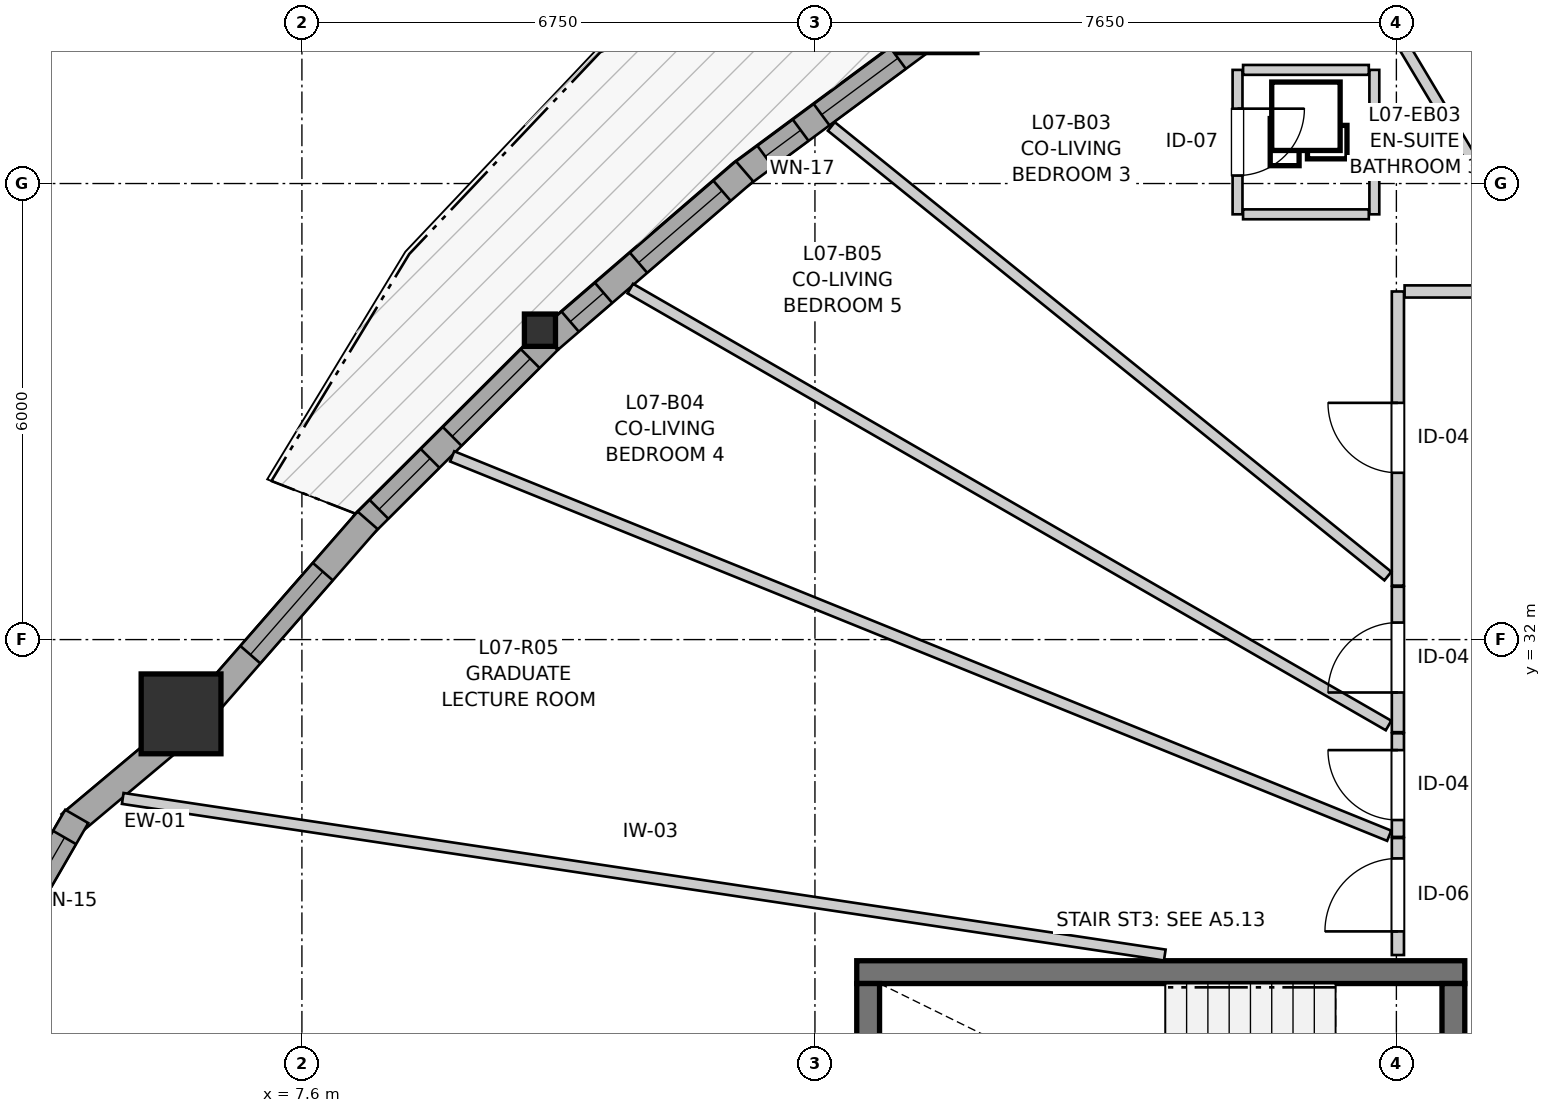
"""IFC4 building model, lengths in metres.
Left out: names, types, materials, properties, quantities, classifications, styles, units other than length and angle.
Written with IfcOpenShell. Run it as: python <this file> out.ifc"""

import sys

from ifc_helpers import new_model, si_unit, direction, frame, frame_2d, origin, origin_2d, place, context, subcontext, project, spatial, rectangle, i_section, extrude, source, transform, mapped, element, fill, save


model = new_model("IFC4")
c1 = context("Model", 3, precision=1e-05, world=origin(), true_north=direction((0.0, 1.0)))
c2 = subcontext(c1, "Body", "Model", "MODEL_VIEW")
j1 = project(units=[si_unit("LENGTHUNIT", "METRE"), si_unit("PLANEANGLEUNIT", "RADIAN")], contexts=[c1])
p1 = place(None, origin())
s1 = spatial("IfcSite", under=j1, at=p1, CompositionType="ELEMENT")
p2 = place(p1, origin())
s2 = spatial("IfcBuilding", under=s1, at=p2, CompositionType="ELEMENT")
p3 = place(p2, frame((0.0, 0.0, 27.0)))
s3 = spatial("IfcBuildingStorey", under=s2, at=p3, CompositionType="ELEMENT", Elevation=27.0)
p4 = place(p3, frame((22.9, 27.625, 0.0), z_axis=(0.0, 0.0, 1.0), x_axis=(-1.0, 0.0, 0.0)))
e1 = element("IfcWall", 1, at=p4, inside=s3, PredefinedType="SHEAR", context=c2, shape_type="SweptSolid", body=[
    extrude(rectangle(XDim=8.0, YDim=0.3, at=frame_2d((4.0, 0.0))), origin(), (0.0, 0.0, 1.0), 2.935),
])
p5 = place(p3, frame((15.05, 27.475, 0.0), z_axis=(0.0, 0.0, 1.0), x_axis=(0.0, -1.0, 0.0)))
e2 = element("IfcWall", 2, at=p5, inside=s3, PredefinedType="SHEAR", context=c2, shape_type="SweptSolid", body=[
    extrude(rectangle(XDim=2.95, YDim=0.3, at=frame_2d((1.475, 0.0))), origin(), (0.0, 0.0, 1.0), 2.935),
])
p6 = place(p3, frame((22.75, 24.525, 0.0), z_axis=(0.0, 0.0, 1.0), x_axis=(0.0, 1.0, 0.0)))
e3 = element("IfcWall", 3, at=p6, inside=s3, PredefinedType="SHEAR", context=c2, shape_type="SweptSolid", body=[
    extrude(rectangle(XDim=2.95, YDim=0.3, at=frame_2d((1.475, 0.0))), origin(), (0.0, 0.0, 1.0), 2.935),
])
p7 = place(p6, frame((0.985, 0.0, 0.0)))
e4 = element("IfcOpeningElement", 4, at=p7, cuts=e3, PredefinedType="OPENING", context=c2, shape_type="SweptSolid", body=[
    extrude(rectangle(XDim=0.98, YDim=2.15, at=frame_2d((0.49, 1.075))), frame((0.0, 0.16, 0.0), z_axis=(0.0, -1.0, 0.0), x_axis=(1.0, 0.0, 0.0)), (0.0, 0.0, 1.0), 0.32),
])
m1 = source(origin(), c2, "Body", "SweptSolid", [
    extrude(rectangle(XDim=1.05, YDim=1.05, at=origin_2d()), origin(), (0.0, 0.0, 1.0), 2.935),
])
for number, where, z_axis, x_axis in (
    (5, (6.01, 31.023, 0.0), (0.0, 0.0, 1.0), (1.0, 0.0, 0.0)),
    (6, (15.956, 40.247, 0.0), (0.0, 0.0, 1.0), (1.0, 0.0, 0.0)),
):
    element("IfcColumn", number, at=place(p3, frame(where, z_axis=z_axis, x_axis=x_axis)), inside=s3, PredefinedType="COLUMN", context=c2, shape_type="MappedRepresentation", body=[
        mapped(m1, transform((0.0, 0.0, 0.0), x_axis=(1.0, 0.0, 0.0), y_axis=(0.0, 1.0, 0.0), z_axis=(0.0, 0.0, 1.0), scale=1.0)),
    ])
m2 = source(origin(), c2, "Body", "SweptSolid", [
    extrude(i_section(OverallWidth=0.409, OverallDepth=0.425, WebThickness=0.03, FlangeThickness=0.048, FilletRadius=0.015, at=origin_2d()), origin(), (0.0, 0.0, 1.0), 2.935),
])
p8 = place(p3, frame((10.732, 36.07, 0.0), z_axis=(0.0, 0.0, 1.0), x_axis=(1.0, 0.0, 0.0)))
e7 = element("IfcColumn", 7, at=p8, inside=s3, PredefinedType="PILASTER", context=c2, shape_type="MappedRepresentation", body=[
    mapped(m2, transform((0.0, 0.0, 0.0), x_axis=(1.0, 0.0, 0.0), y_axis=(0.0, 1.0, 0.0), z_axis=(0.0, 0.0, 1.0), scale=1.0)),
])
p9 = place(p3, frame((5.893, 30.696, 0.0), z_axis=(0.0, 0.0, 1.0), x_axis=(-0.766001205563, -0.64283913468, 0.0)))
e8 = element("IfcWall", 8, at=p9, inside=s3, PredefinedType="SOLIDWALL", context=c2, shape_type="SweptSolid", body=[
    extrude(rectangle(XDim=1.752, YDim=0.35, at=frame_2d((0.876, 0.0))), origin(), (0.0, 0.0, 1.0), 2.415),
])
p10 = place(p3, frame((4.637, 29.674, 0.0), z_axis=(0.0, 0.0, 1.0), x_axis=(-0.499995423472, -0.866028046028, 0.0)))
e9 = element("IfcWall", 9, at=p10, inside=s3, PredefinedType="SOLIDWALL", context=c2, shape_type="SweptSolid", body=[
    extrude(rectangle(XDim=2.09, YDim=0.35, at=frame_2d((1.045, 0.0))), origin(), (0.0, 0.0, 1.0), 2.415),
])
p11 = place(p10, frame((0.32, 0.0, 0.82)))
e10 = element("IfcOpeningElement", 10, at=p11, cuts=e9, PredefinedType="OPENING", context=c2, shape_type="SweptSolid", body=[
    extrude(rectangle(XDim=1.45, YDim=1.25, at=frame_2d((0.725, 0.625))), frame((0.0, 0.185, 0.0), z_axis=(0.0, -1.0, 0.0), x_axis=(1.0, 0.0, 0.0)), (0.0, 0.0, 1.0), 0.37),
])
p12 = place(p3, frame((15.819, 39.928, 0.0), z_axis=(0.0, 0.0, 1.0), x_axis=(-0.803825144674, -0.594865645999, 0.0)))
e11 = element("IfcWall", 11, at=p12, inside=s3, PredefinedType="SOLIDWALL", context=c2, shape_type="SweptSolid", body=[
    extrude(rectangle(XDim=3.066, YDim=0.35, at=frame_2d((1.533, 0.0))), origin(), (0.0, 0.0, 1.0), 2.415),
])
p13 = place(p12, frame((0.469, 0.0, 0.82)))
e12 = element("IfcOpeningElement", 12, at=p13, cuts=e11, PredefinedType="OPENING", context=c2, shape_type="SweptSolid", body=[
    extrude(rectangle(XDim=1.25, YDim=1.35, at=frame_2d((0.625, 0.675))), frame((0.0, 0.185, 0.0), z_axis=(0.0, -1.0, 0.0), x_axis=(1.0, 0.0, 0.0)), (0.0, 0.0, 1.0), 0.37),
])
p14 = place(p12, frame((2.062, 0.0, 0.82)))
e13 = element("IfcOpeningElement", 13, at=p14, cuts=e11, PredefinedType="OPENING", context=c2, shape_type="SweptSolid", body=[
    extrude(rectangle(XDim=0.58, YDim=1.35, at=frame_2d((0.29, 0.675))), frame((0.0, 0.185, 0.0), z_axis=(0.0, -1.0, 0.0), x_axis=(1.0, 0.0, 0.0)), (0.0, 0.0, 1.0), 0.37),
])
p15 = place(p3, frame((13.424, 38.16, 0.0), z_axis=(0.0, 0.0, 1.0), x_axis=(-0.757512075852, -0.652821150805, 0.0)))
e14 = element("IfcWall", 14, at=p15, inside=s3, PredefinedType="SOLIDWALL", context=c2, shape_type="SweptSolid", body=[
    extrude(rectangle(XDim=3.384, YDim=0.35, at=frame_2d((1.692, 0.0))), origin(), (0.0, 0.0, 1.0), 2.415),
])
p16 = place(p15, frame((0.392, 0.0, 0.82)))
e15 = element("IfcOpeningElement", 15, at=p16, cuts=e14, PredefinedType="OPENING", context=c2, shape_type="SweptSolid", body=[
    extrude(rectangle(XDim=1.45, YDim=1.25, at=frame_2d((0.725, 0.625))), frame((0.0, 0.185, 0.0), z_axis=(0.0, -1.0, 0.0), x_axis=(1.0, 0.0, 0.0)), (0.0, 0.0, 1.0), 0.37),
])
p17 = place(p15, frame((2.449, 0.0, 0.82)))
e16 = element("IfcOpeningElement", 16, at=p17, cuts=e14, PredefinedType="OPENING", context=c2, shape_type="SweptSolid", body=[
    extrude(rectangle(XDim=0.58, YDim=1.35, at=frame_2d((0.29, 0.675))), frame((0.0, 0.185, 0.0), z_axis=(0.0, -1.0, 0.0), x_axis=(1.0, 0.0, 0.0)), (0.0, 0.0, 1.0), 0.37),
])
p18 = place(p3, frame((10.841, 35.932, 0.0), z_axis=(0.0, 0.0, 1.0), x_axis=(-0.708383272101, -0.70582798174, 0.0)))
e17 = element("IfcWall", 17, at=p18, inside=s3, PredefinedType="SOLIDWALL", context=c2, shape_type="SweptSolid", body=[
    extrude(rectangle(XDim=3.439, YDim=0.35, at=frame_2d((1.72, 0.0))), origin(), (0.0, 0.0, 1.0), 2.415),
])
p19 = place(p18, frame((0.334, 0.0, 0.82)))
e18 = element("IfcOpeningElement", 18, at=p19, cuts=e17, PredefinedType="OPENING", context=c2, shape_type="SweptSolid", body=[
    extrude(rectangle(XDim=1.45, YDim=1.25, at=frame_2d((0.725, 0.625))), frame((0.0, 0.185, 0.0), z_axis=(0.0, -1.0, 0.0), x_axis=(1.0, 0.0, 0.0)), (0.0, 0.0, 1.0), 0.37),
])
p20 = place(p18, frame((2.194, 0.0, 0.82)))
e19 = element("IfcOpeningElement", 19, at=p20, cuts=e17, PredefinedType="OPENING", context=c2, shape_type="SweptSolid", body=[
    extrude(rectangle(XDim=0.95, YDim=1.35, at=frame_2d((0.475, 0.675))), frame((0.0, 0.185, 0.0), z_axis=(0.0, -1.0, 0.0), x_axis=(1.0, 0.0, 0.0)), (0.0, 0.0, 1.0), 0.37),
])
p21 = place(p3, frame((8.465, 33.569, 0.0), z_axis=(0.0, 0.0, 1.0), x_axis=(-0.657600500685, -0.753366830634, 0.0)))
e20 = element("IfcWall", 20, at=p21, inside=s3, PredefinedType="SOLIDWALL", context=c2, shape_type="SweptSolid", body=[
    extrude(rectangle(XDim=3.233, YDim=0.35, at=frame_2d((1.616, 0.0))), origin(), (0.0, 0.0, 1.0), 2.415),
])
p22 = place(p21, frame((0.896, 0.0, 0.82)))
e21 = element("IfcOpeningElement", 21, at=p22, cuts=e20, PredefinedType="OPENING", context=c2, shape_type="SweptSolid", body=[
    extrude(rectangle(XDim=1.45, YDim=1.25, at=frame_2d((0.725, 0.625))), frame((0.0, 0.185, 0.0), z_axis=(0.0, -1.0, 0.0), x_axis=(1.0, 0.0, 0.0)), (0.0, 0.0, 1.0), 0.37),
])
p23 = place(p3, frame((22.02, 32.71, 0.0), z_axis=(0.0, 0.0, 1.0), x_axis=(0.0, 1.0, 0.0)))
e22 = element("IfcWall", 22, at=p23, inside=s3, PredefinedType="PARTITIONING", context=c2, shape_type="SweptSolid", body=[
    extrude(rectangle(XDim=3.87, YDim=0.16, at=frame_2d((1.935, 0.0))), origin(), (0.0, 0.0, 1.0), 2.935),
])
p24 = place(p23, frame((1.485, 0.0, 0.0)))
e23 = element("IfcOpeningElement", 23, at=p24, cuts=e22, PredefinedType="OPENING", context=c2, shape_type="SweptSolid", body=[
    extrude(rectangle(XDim=0.92, YDim=2.1, at=frame_2d((0.46, 1.05))), frame((0.0, 0.09, 0.0), z_axis=(0.0, -1.0, 0.0), x_axis=(1.0, 0.0, 0.0)), (0.0, 0.0, 1.0), 0.18),
])
p25 = place(p3, frame((22.02, 30.782, 0.0), z_axis=(0.0, 0.0, 1.0), x_axis=(0.0, 1.0, 0.0)))
e24 = element("IfcWall", 24, at=p25, inside=s3, PredefinedType="PARTITIONING", context=c2, shape_type="SweptSolid", body=[
    extrude(rectangle(XDim=1.913, YDim=0.16, at=frame_2d((0.957, 0.0))), origin(), (0.0, 0.0, 1.0), 2.935),
])
p26 = place(p25, frame((0.522, 0.0, 0.0)))
e25 = element("IfcOpeningElement", 25, at=p26, cuts=e24, PredefinedType="OPENING", context=c2, shape_type="SweptSolid", body=[
    extrude(rectangle(XDim=0.92, YDim=2.1, at=frame_2d((0.46, 1.05))), frame((0.0, 0.09, 0.0), z_axis=(0.0, -1.0, 0.0), x_axis=(1.0, 0.0, 0.0)), (0.0, 0.0, 1.0), 0.18),
])
p27 = place(p3, frame((19.91, 39.495, 0.0), z_axis=(0.0, 0.0, 1.0), x_axis=(0.0, -1.0, 0.0)))
e26 = element("IfcWall", 26, at=p27, inside=s3, PredefinedType="PARTITIONING", context=c2, shape_type="SweptSolid", body=[
    extrude(rectangle(XDim=1.9, YDim=0.13, at=frame_2d((0.95, 0.0))), origin(), (0.0, 0.0, 1.0), 2.935),
])
p28 = place(p27, frame((0.51, 0.0, 0.0)))
e27 = element("IfcOpeningElement", 27, at=p28, cuts=e26, PredefinedType="OPENING", context=c2, shape_type="SweptSolid", body=[
    extrude(rectangle(XDim=0.88, YDim=2.05, at=frame_2d((0.44, 1.025))), frame((0.0, 0.075, 0.0), z_axis=(0.0, -1.0, 0.0), x_axis=(1.0, 0.0, 0.0)), (0.0, 0.0, 1.0), 0.15),
])
p29 = place(p3, frame((22.02, 27.85, 0.0), z_axis=(0.0, 0.0, 1.0), x_axis=(0.0, 1.0, 0.0)))
e28 = element("IfcWall", 28, at=p29, inside=s3, PredefinedType="PARTITIONING", context=c2, shape_type="SweptSolid", body=[
    extrude(rectangle(XDim=1.539, YDim=0.16, at=frame_2d((0.77, 0.0))), origin(), (0.0, 0.0, 1.0), 2.935),
])
p30 = place(p29, frame((0.311, 0.0, 0.0)))
e29 = element("IfcOpeningElement", 29, at=p30, cuts=e28, PredefinedType="OPENING", context=c2, shape_type="SweptSolid", body=[
    extrude(rectangle(XDim=0.96, YDim=2.1, at=frame_2d((0.48, 1.05))), frame((0.0, 0.09, 0.0), z_axis=(0.0, -1.0, 0.0), x_axis=(1.0, 0.0, 0.0)), (0.0, 0.0, 1.0), 0.18),
])
p31 = place(p3, frame((22.02, 29.404, 0.0), z_axis=(0.0, 0.0, 1.0), x_axis=(0.0, 1.0, 0.0)))
e30 = element("IfcWall", 30, at=p31, inside=s3, PredefinedType="PARTITIONING", context=c2, shape_type="SweptSolid", body=[
    extrude(rectangle(XDim=1.363, YDim=0.16, at=frame_2d((0.682, 0.0))), origin(), (0.0, 0.0, 1.0), 2.935),
])
p32 = place(p31, frame((0.222, 0.0, 0.0)))
e31 = element("IfcOpeningElement", 31, at=p32, cuts=e30, PredefinedType="OPENING", context=c2, shape_type="SweptSolid", body=[
    extrude(rectangle(XDim=0.92, YDim=2.1, at=frame_2d((0.46, 1.05))), frame((0.0, 0.09, 0.0), z_axis=(0.0, -1.0, 0.0), x_axis=(1.0, 0.0, 0.0)), (0.0, 0.0, 1.0), 0.18),
])
p33 = place(p3, frame((5.242, 29.91, 0.0), z_axis=(0.0, 0.0, 1.0), x_axis=(0.988899381561, -0.148586719285, 0.0)))
e32 = element("IfcWall", 32, at=p33, inside=s3, PredefinedType="PARTITIONING", context=c2, shape_type="SweptSolid", body=[
    extrude(rectangle(XDim=13.864, YDim=0.145, at=frame_2d((6.932, 0.0))), origin(), (0.0, 0.0, 1.0), 2.935),
])
p34 = place(p3, frame((9.577, 34.41, 0.0), z_axis=(0.0, 0.0, 1.0), x_axis=(0.926920362809, -0.375258099194, 0.0)))
e33 = element("IfcWall", 33, at=p34, inside=s3, PredefinedType="PARTITIONING", context=c2, shape_type="SweptSolid", body=[
    extrude(rectangle(XDim=13.3, YDim=0.145, at=frame_2d((6.65, 0.0))), origin(), (0.0, 0.0, 1.0), 2.935),
])
p35 = place(p3, frame((11.92, 36.618, 0.0), z_axis=(0.0, 0.0, 1.0), x_axis=(0.866473494239, -0.499223080177, 0.0)))
e34 = element("IfcWall", 34, at=p35, inside=s3, PredefinedType="PARTITIONING", context=c2, shape_type="SweptSolid", body=[
    extrude(rectangle(XDim=11.514, YDim=0.145, at=frame_2d((5.757, 0.0))), origin(), (0.0, 0.0, 1.0), 2.935),
])
p36 = place(p3, frame((14.566, 38.751, 0.0), z_axis=(0.0, 0.0, 1.0), x_axis=(0.777881688073, -0.628410756879, 0.0)))
e35 = element("IfcWall", 35, at=p36, inside=s3, PredefinedType="PARTITIONING", context=c2, shape_type="SweptSolid", body=[
    extrude(rectangle(XDim=9.413, YDim=0.145, at=frame_2d((4.707, 0.0))), origin(), (0.0, 0.0, 1.0), 2.935),
])
p37 = place(p3, frame((20.481, 42.51, 0.0), z_axis=(0.0, 0.0, 1.0), x_axis=(0.513067331262, -0.858348363773, 0.0)))
e36 = element("IfcWall", 36, at=p37, inside=s3, PredefinedType="PARTITIONING", context=c2, shape_type="SweptSolid", body=[
    extrude(rectangle(XDim=6.765, YDim=0.145, at=frame_2d((3.382, 0.0))), origin(), (0.0, 0.0, 1.0), 2.935),
])
p38 = place(p3, frame((22.108, 36.58, 0.0), z_axis=(0.0, 0.0, 1.0), x_axis=(1.0, 0.0, 0.0)))
e37 = element("IfcWall", 37, at=p38, inside=s3, PredefinedType="PARTITIONING", context=c2, shape_type="SweptSolid", body=[
    extrude(rectangle(XDim=1.746, YDim=0.16, at=frame_2d((0.873, 0.0))), origin(), (0.0, 0.0, 1.0), 2.543),
])
p39 = place(p3, frame((21.71, 37.595, 0.0), z_axis=(0.0, 0.0, 1.0), x_axis=(0.0, 1.0, 0.0)))
e38 = element("IfcWall", 38, at=p39, inside=s3, PredefinedType="PARTITIONING", context=c2, shape_type="SweptSolid", body=[
    extrude(rectangle(XDim=1.9, YDim=0.13, at=frame_2d((0.95, 0.0))), origin(), (0.0, 0.0, 1.0), 2.935),
])
for number, where, z_axis, x_axis in (
    (39, (19.983, 39.495, 0.0), (0.0, 0.0, 1.0), (1.0, 0.0, 0.0)),
    (40, (19.983, 37.595, 0.0), (0.0, 0.0, 1.0), (1.0, 0.0, 0.0)),
):
    element("IfcWall", number, at=place(p3, frame(where, z_axis=z_axis, x_axis=x_axis)), inside=s3, PredefinedType="PARTITIONING", context=c2, shape_type="SweptSolid", body=[
        extrude(rectangle(XDim=1.654, YDim=0.13, at=frame_2d((0.827, 0.0))), origin(), (0.0, 0.0, 1.0), 2.935),
    ])
m3 = source(origin(), c2, "Body", "SweptSolid", [
    extrude(rectangle(XDim=1.45, YDim=1.25, at=frame_2d((0.725, 0.625))), frame((0.0, 0.03, 0.0), z_axis=(0.0, -1.0, 0.0), x_axis=(1.0, 0.0, 0.0)), (0.0, 0.0, 1.0), 0.06),
])
p40 = place(p11, origin())
e41 = element("IfcWindow", 41, at=p40, inside=s3, PartitioningType="SINGLE_PANEL", PredefinedType="WINDOW", context=c2, shape_type="MappedRepresentation", body=[
    mapped(m3, transform((0.0, 0.0, 0.0), x_axis=(1.0, 0.0, 0.0), y_axis=(0.0, 1.0, 0.0), z_axis=(0.0, 0.0, 1.0), scale=1.0)),
])
fill(e10, e41)
m4 = source(origin(), c2, "Body", "SweptSolid", [
    extrude(rectangle(XDim=1.25, YDim=1.35, at=frame_2d((0.625, 0.675))), frame((0.0, 0.03, 0.0), z_axis=(0.0, -1.0, 0.0), x_axis=(1.0, 0.0, 0.0)), (0.0, 0.0, 1.0), 0.06),
])
p41 = place(p13, origin())
e42 = element("IfcWindow", 42, at=p41, inside=s3, PartitioningType="SINGLE_PANEL", PredefinedType="WINDOW", context=c2, shape_type="MappedRepresentation", body=[
    mapped(m4, transform((0.0, 0.0, 0.0), x_axis=(1.0, 0.0, 0.0), y_axis=(0.0, 1.0, 0.0), z_axis=(0.0, 0.0, 1.0), scale=1.0)),
])
fill(e12, e42)
m5 = source(origin(), c2, "Body", "SweptSolid", [
    extrude(rectangle(XDim=0.58, YDim=1.35, at=frame_2d((0.29, 0.675))), frame((0.0, 0.03, 0.0), z_axis=(0.0, -1.0, 0.0), x_axis=(1.0, 0.0, 0.0)), (0.0, 0.0, 1.0), 0.06),
])
p42 = place(p14, origin())
e43 = element("IfcWindow", 43, at=p42, inside=s3, PartitioningType="SINGLE_PANEL", PredefinedType="WINDOW", context=c2, shape_type="MappedRepresentation", body=[
    mapped(m5, transform((0.0, 0.0, 0.0), x_axis=(1.0, 0.0, 0.0), y_axis=(0.0, 1.0, 0.0), z_axis=(0.0, 0.0, 1.0), scale=1.0)),
])
fill(e13, e43)
p43 = place(p16, origin())
e44 = element("IfcWindow", 44, at=p43, inside=s3, PartitioningType="SINGLE_PANEL", PredefinedType="WINDOW", context=c2, shape_type="MappedRepresentation", body=[
    mapped(m3, transform((0.0, 0.0, 0.0), x_axis=(1.0, 0.0, 0.0), y_axis=(0.0, 1.0, 0.0), z_axis=(0.0, 0.0, 1.0), scale=1.0)),
])
fill(e15, e44)
p44 = place(p17, origin())
e45 = element("IfcWindow", 45, at=p44, inside=s3, PartitioningType="SINGLE_PANEL", PredefinedType="WINDOW", context=c2, shape_type="MappedRepresentation", body=[
    mapped(m5, transform((0.0, 0.0, 0.0), x_axis=(1.0, 0.0, 0.0), y_axis=(0.0, 1.0, 0.0), z_axis=(0.0, 0.0, 1.0), scale=1.0)),
])
fill(e16, e45)
p45 = place(p19, origin())
e46 = element("IfcWindow", 46, at=p45, inside=s3, PartitioningType="SINGLE_PANEL", PredefinedType="WINDOW", context=c2, shape_type="MappedRepresentation", body=[
    mapped(m3, transform((0.0, 0.0, 0.0), x_axis=(1.0, 0.0, 0.0), y_axis=(0.0, 1.0, 0.0), z_axis=(0.0, 0.0, 1.0), scale=1.0)),
])
fill(e18, e46)
m6 = source(origin(), c2, "Body", "SweptSolid", [
    extrude(rectangle(XDim=0.95, YDim=1.35, at=frame_2d((0.475, 0.675))), frame((0.0, 0.03, 0.0), z_axis=(0.0, -1.0, 0.0), x_axis=(1.0, 0.0, 0.0)), (0.0, 0.0, 1.0), 0.06),
])
p46 = place(p20, origin())
e47 = element("IfcWindow", 47, at=p46, inside=s3, PartitioningType="SINGLE_PANEL", PredefinedType="WINDOW", context=c2, shape_type="MappedRepresentation", body=[
    mapped(m6, transform((0.0, 0.0, 0.0), x_axis=(1.0, 0.0, 0.0), y_axis=(0.0, 1.0, 0.0), z_axis=(0.0, 0.0, 1.0), scale=1.0)),
])
fill(e19, e47)
p47 = place(p22, origin())
e48 = element("IfcWindow", 48, at=p47, inside=s3, PartitioningType="SINGLE_PANEL", PredefinedType="WINDOW", context=c2, shape_type="MappedRepresentation", body=[
    mapped(m3, transform((0.0, 0.0, 0.0), x_axis=(1.0, 0.0, 0.0), y_axis=(0.0, 1.0, 0.0), z_axis=(0.0, 0.0, 1.0), scale=1.0)),
])
fill(e21, e48)
m7 = source(origin(), c2, "Body", "SweptSolid", [
    extrude(rectangle(XDim=0.92, YDim=2.1, at=frame_2d((0.46, 1.05))), frame((0.0, 0.025, 0.0), z_axis=(0.0, -1.0, 0.0), x_axis=(1.0, 0.0, 0.0)), (0.0, 0.0, 1.0), 0.05),
])
p48 = place(p24, origin())
e49 = element("IfcDoor", 49, at=p48, inside=s3, OperationType="SINGLE_SWING_RIGHT", PredefinedType="DOOR", context=c2, shape_type="MappedRepresentation", body=[
    mapped(m7, transform((0.0, 0.0, 0.0), x_axis=(1.0, 0.0, 0.0), y_axis=(0.0, 1.0, 0.0), z_axis=(0.0, 0.0, 1.0), scale=1.0)),
])
fill(e23, e49)
p49 = place(p26, origin())
e50 = element("IfcDoor", 50, at=p49, inside=s3, OperationType="SINGLE_SWING_LEFT", PredefinedType="DOOR", context=c2, shape_type="MappedRepresentation", body=[
    mapped(m7, transform((0.0, 0.0, 0.0), x_axis=(1.0, 0.0, 0.0), y_axis=(0.0, 1.0, 0.0), z_axis=(0.0, 0.0, 1.0), scale=1.0)),
])
fill(e25, e50)
m8 = source(origin(), c2, "Body", "SweptSolid", [
    extrude(rectangle(XDim=0.88, YDim=2.05, at=frame_2d((0.44, 1.025))), frame((0.0, 0.025, 0.0), z_axis=(0.0, -1.0, 0.0), x_axis=(1.0, 0.0, 0.0)), (0.0, 0.0, 1.0), 0.05),
])
p50 = place(p28, origin())
e51 = element("IfcDoor", 51, at=p50, inside=s3, OperationType="SINGLE_SWING_LEFT", PredefinedType="DOOR", context=c2, shape_type="MappedRepresentation", body=[
    mapped(m8, transform((0.0, 0.0, 0.0), x_axis=(1.0, 0.0, 0.0), y_axis=(0.0, 1.0, 0.0), z_axis=(0.0, 0.0, 1.0), scale=1.0)),
])
fill(e27, e51)
m9 = source(origin(), c2, "Body", "SweptSolid", [
    extrude(rectangle(XDim=0.96, YDim=2.1, at=frame_2d((0.48, 1.05))), frame((0.0, 0.025, 0.0), z_axis=(0.0, -1.0, 0.0), x_axis=(1.0, 0.0, 0.0)), (0.0, 0.0, 1.0), 0.05),
])
p51 = place(p30, origin())
e52 = element("IfcDoor", 52, at=p51, inside=s3, OperationType="SINGLE_SWING_LEFT", PredefinedType="DOOR", context=c2, shape_type="MappedRepresentation", body=[
    mapped(m9, transform((0.0, 0.0, 0.0), x_axis=(1.0, 0.0, 0.0), y_axis=(0.0, 1.0, 0.0), z_axis=(0.0, 0.0, 1.0), scale=1.0)),
])
fill(e29, e52)
p52 = place(p32, origin())
e53 = element("IfcDoor", 53, at=p52, inside=s3, OperationType="SINGLE_SWING_RIGHT", PredefinedType="DOOR", context=c2, shape_type="MappedRepresentation", body=[
    mapped(m7, transform((0.0, 0.0, 0.0), x_axis=(1.0, 0.0, 0.0), y_axis=(0.0, 1.0, 0.0), z_axis=(0.0, 0.0, 1.0), scale=1.0)),
])
fill(e31, e53)
save(model, sys.argv[1])
